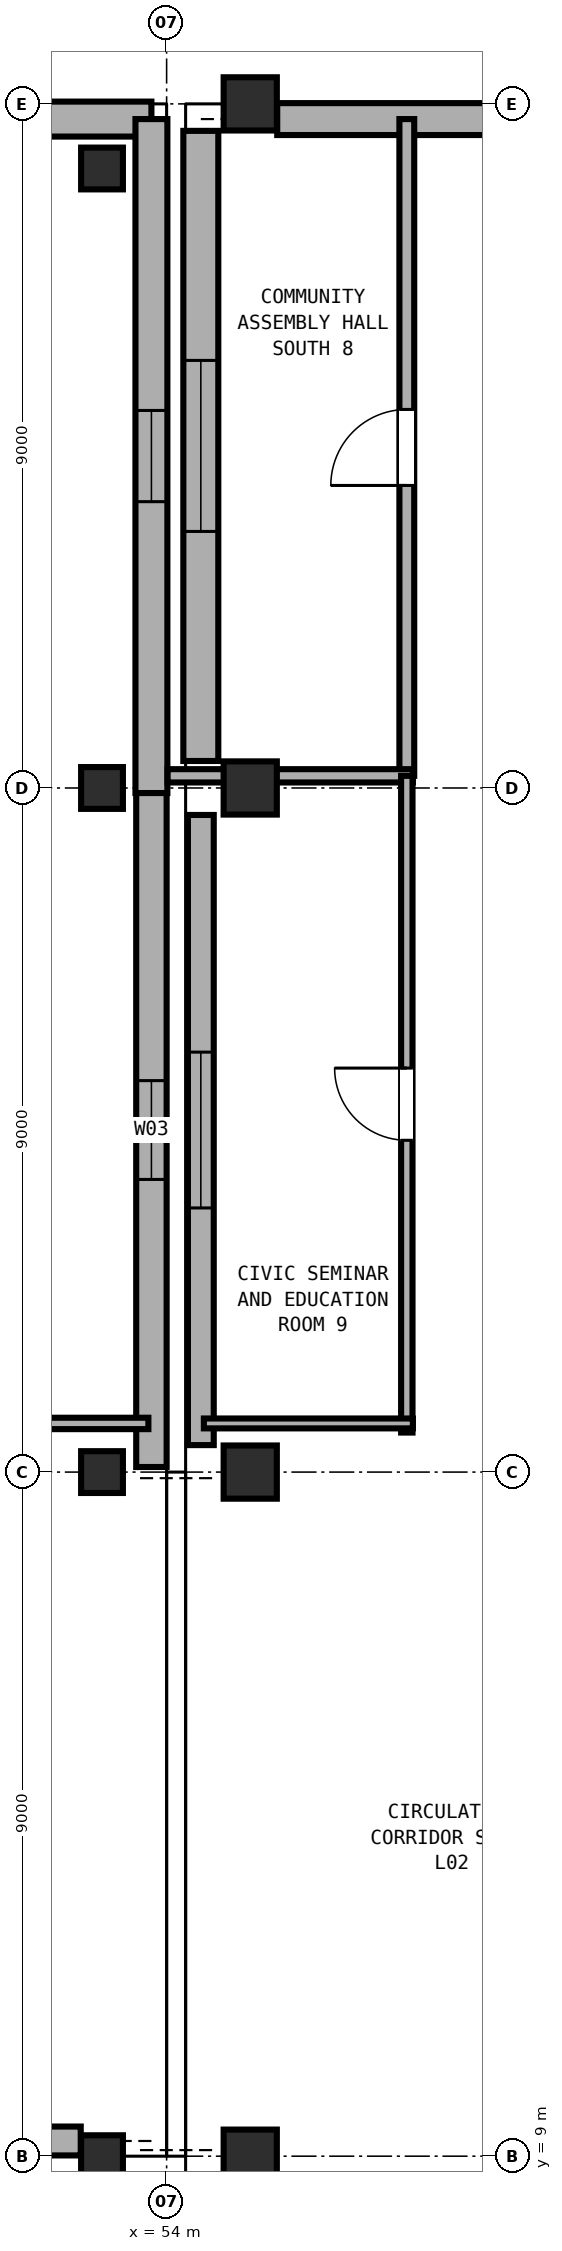
"""IFC4 building model, lengths in metres.
Left out: names, types, materials, properties, quantities, classifications, styles, units other than length and angle.
Written with IfcOpenShell. Run it as: python <this file> out.ifc"""

import sys

from ifc_helpers import new_model, si_unit, direction, frame, frame_2d, origin, origin_2d, place, context, subcontext, project, spatial, rectangle, extrude, element, fill, save


model = new_model("IFC4")
c1 = context("Model", 3, precision=1e-05, world=origin(), true_north=direction((0.0, 1.0)))
c2 = subcontext(c1, "Body", "Model", "MODEL_VIEW")
j1 = project(units=[si_unit("LENGTHUNIT", "METRE"), si_unit("PLANEANGLEUNIT", "RADIAN")], contexts=[c1])
p1 = place(None, origin())
s1 = spatial("IfcSite", under=j1, at=p1, CompositionType="ELEMENT")
p2 = place(p1, origin())
s2 = spatial("IfcBuilding", under=s1, at=p2, CompositionType="ELEMENT")
p3 = place(p2, frame((0.0, 0.0, 9.6)))
s3 = spatial("IfcBuildingStorey", under=s2, at=p3, CompositionType="ELEMENT", Elevation=9.6)
for number, where, z_axis, x_axis in (
    (1, (55.1, 9.0, 0.0), (0.0, 0.0, 1.0), (1.0, 0.0, 0.0)),
    (2, (55.1, 18.0, 0.0), (0.0, 0.0, 1.0), (1.0, 0.0, 0.0)),
    (3, (55.1, 27.0, 0.0), (0.0, 0.0, 1.0), (1.0, 0.0, 0.0)),
    (4, (55.1, 36.0, 0.0), (0.0, 0.0, 1.0), (1.0, 0.0, 0.0)),
):
    element("IfcColumn", number, at=place(p3, frame(where, z_axis=z_axis, x_axis=x_axis)), inside=s3, PredefinedType="COLUMN", context=c2, shape_type="SweptSolid", body=[
        extrude(rectangle(XDim=0.7, YDim=0.7, at=origin_2d()), origin(), (0.0, 0.0, 1.0), 4.8),
    ])
for number, where, z_axis, x_axis in (
    (5, (53.15, 9.0, 0.0), (0.0, 0.0, 1.0), (1.0, 0.0, 0.0)),
    (6, (53.15, 18.0, 0.0), (0.0, 0.0, 1.0), (1.0, 0.0, 0.0)),
    (7, (53.15, 27.0, 0.0), (0.0, 0.0, 1.0), (1.0, 0.0, 0.0)),
    (8, (53.15, 35.15, 0.0), (0.0, 0.0, 1.0), (1.0, 0.0, 0.0)),
):
    element("IfcColumn", number, at=place(p3, frame(where, z_axis=z_axis, x_axis=x_axis)), inside=s3, PredefinedType="COLUMN", context=c2, shape_type="SweptSolid", body=[
        extrude(rectangle(XDim=0.55, YDim=0.55, at=origin_2d()), origin(), (0.0, 0.0, 1.0), 4.8),
    ])
p4 = place(p3, frame((54.45, 18.355, 0.0), z_axis=(0.0, 0.0, 1.0), x_axis=(0.0, 1.0, 0.0)))
e9 = element("IfcWall", 9, at=p4, inside=s3, PredefinedType="SOLIDWALL", context=c2, shape_type="SweptSolid", body=[
    extrude(rectangle(XDim=8.29, YDim=0.34, at=frame_2d((4.145, 0.0))), origin(), (0.0, 0.0, 1.0), 3.58),
])
p5 = place(p4, frame((3.12, 0.0, 0.9)))
e10 = element("IfcOpeningElement", 10, at=p5, cuts=e9, PredefinedType="OPENING", context=c2, shape_type="SweptSolid", body=[
    extrude(rectangle(XDim=2.05, YDim=2.0, at=frame_2d((1.025, 1.0))), frame((0.0, 0.18, 0.0), z_axis=(0.0, -1.0, 0.0), x_axis=(1.0, 0.0, 0.0)), (0.0, 0.0, 1.0), 0.36),
])
p6 = place(p3, frame((54.45, 27.355, 0.0), z_axis=(0.0, 0.0, 1.0), x_axis=(0.0, 1.0, 0.0)))
e11 = element("IfcWall", 11, at=p6, inside=s3, PredefinedType="SOLIDWALL", context=c2, shape_type="SweptSolid", body=[
    extrude(rectangle(XDim=8.29, YDim=0.46, at=frame_2d((4.145, 0.0))), origin(), (0.0, 0.0, 1.0), 3.58),
])
p7 = place(p6, frame((3.02, 0.0, 0.9)))
e12 = element("IfcOpeningElement", 12, at=p7, cuts=e11, PredefinedType="OPENING", context=c2, shape_type="SweptSolid", body=[
    extrude(rectangle(XDim=2.25, YDim=2.05, at=frame_2d((1.125, 1.025))), frame((0.0, 0.24, 0.0), z_axis=(0.0, -1.0, 0.0), x_axis=(1.0, 0.0, 0.0)), (0.0, 0.0, 1.0), 0.48),
])
p8 = place(p3, frame((55.455, 35.8, 0.0), z_axis=(0.0, 0.0, 1.0), x_axis=(1.0, 0.0, 0.0)))
e13 = element("IfcWall", 13, at=p8, inside=s3, PredefinedType="SOLIDWALL", context=c2, shape_type="SweptSolid", body=[
    extrude(rectangle(XDim=7.19, YDim=0.42, at=frame_2d((3.595, 0.0))), origin(), (0.0, 0.0, 1.0), 3.58),
])
p9 = place(p8, frame((3.045, 0.0, 0.9)))
e14 = element("IfcOpeningElement", 14, at=p9, cuts=e13, PredefinedType="OPENING", context=c2, shape_type="SweptSolid", body=[
    extrude(rectangle(XDim=1.1, YDim=1.4, at=frame_2d((0.55, 0.7))), frame((0.0, 0.22, 0.0), z_axis=(0.0, -1.0, 0.0), x_axis=(1.0, 0.0, 0.0)), (0.0, 0.0, 1.0), 0.44),
])
p10 = place(p3, frame((44.88, 35.8, 0.0), z_axis=(0.0, 0.0, 1.0), x_axis=(1.0, 0.0, 0.0)))
e15 = element("IfcWall", 15, at=p10, inside=s3, PredefinedType="SOLIDWALL", context=c2, shape_type="SweptSolid", body=[
    extrude(rectangle(XDim=8.92, YDim=0.46, at=frame_2d((4.46, 0.0))), origin(), (0.0, 0.0, 1.0), 3.58),
])
p11 = place(p10, frame((3.91, 0.0, 0.9)))
e16 = element("IfcOpeningElement", 16, at=p11, cuts=e15, PredefinedType="OPENING", context=c2, shape_type="SweptSolid", body=[
    extrude(rectangle(XDim=1.1, YDim=1.4, at=frame_2d((0.55, 0.7))), frame((0.0, 0.24, 0.0), z_axis=(0.0, -1.0, 0.0), x_axis=(1.0, 0.0, 0.0)), (0.0, 0.0, 1.0), 0.48),
])
p12 = place(p3, frame((53.8, 35.8, 0.0), z_axis=(0.0, 0.0, 1.0), x_axis=(0.0, -1.0, 0.0)))
e17 = element("IfcWall", 17, at=p12, inside=s3, PredefinedType="SOLIDWALL", context=c2, shape_type="SweptSolid", body=[
    extrude(rectangle(XDim=8.867, YDim=0.42, at=frame_2d((4.433, 0.0))), origin(), (0.0, 0.0, 1.0), 3.58),
])
p13 = place(p12, frame((3.833, 0.0, 0.9)))
e18 = element("IfcOpeningElement", 18, at=p13, cuts=e17, PredefinedType="OPENING", context=c2, shape_type="SweptSolid", body=[
    extrude(rectangle(XDim=1.2, YDim=1.45, at=frame_2d((0.6, 0.725))), frame((0.0, 0.22, 0.0), z_axis=(0.0, -1.0, 0.0), x_axis=(1.0, 0.0, 0.0)), (0.0, 0.0, 1.0), 0.44),
])
p14 = place(p3, frame((53.8, 26.933, 0.0), z_axis=(0.0, 0.0, 1.0), x_axis=(0.0, -1.0, 0.0)))
e19 = element("IfcWall", 19, at=p14, inside=s3, PredefinedType="SOLIDWALL", context=c2, shape_type="SweptSolid", body=[
    extrude(rectangle(XDim=8.867, YDim=0.4, at=frame_2d((4.433, 0.0))), origin(), (0.0, 0.0, 1.0), 3.58),
])
p15 = place(p14, frame((3.783, 0.0, 0.9)))
e20 = element("IfcOpeningElement", 20, at=p15, cuts=e19, PredefinedType="OPENING", context=c2, shape_type="SweptSolid", body=[
    extrude(rectangle(XDim=1.3, YDim=1.5, at=frame_2d((0.65, 0.75))), frame((0.0, 0.21, 0.0), z_axis=(0.0, -1.0, 0.0), x_axis=(1.0, 0.0, 0.0)), (0.0, 0.0, 1.0), 0.42),
])
p16 = place(p3, frame((52.87, 9.2, 0.0), z_axis=(0.0, 0.0, 1.0), x_axis=(-1.0, 0.0, 0.0)))
e21 = element("IfcWall", 21, at=p16, inside=s3, PredefinedType="SOLIDWALL", context=c2, shape_type="SweptSolid", body=[
    extrude(rectangle(XDim=7.59, YDim=0.38, at=frame_2d((3.795, 0.0))), origin(), (0.0, 0.0, 1.0), 3.58),
])
p17 = place(p16, frame((3.095, 0.0, 0.9)))
e22 = element("IfcOpeningElement", 22, at=p17, cuts=e21, PredefinedType="OPENING", context=c2, shape_type="SweptSolid", body=[
    extrude(rectangle(XDim=1.4, YDim=1.55, at=frame_2d((0.7, 0.775))), frame((0.0, 0.2, 0.0), z_axis=(0.0, -1.0, 0.0), x_axis=(1.0, 0.0, 0.0)), (0.0, 0.0, 1.0), 0.4),
])
p18 = place(p3, frame((57.16, 27.16, 0.0), z_axis=(0.0, 0.0, 1.0), x_axis=(0.0, 1.0, 0.0)))
e23 = element("IfcWall", 23, at=p18, inside=s3, PredefinedType="PARTITIONING", context=c2, shape_type="SweptSolid", body=[
    extrude(rectangle(XDim=8.64, YDim=0.195, at=frame_2d((4.32, 0.0))), origin(), (0.0, 0.0, 1.0), 3.56),
])
p19 = place(p18, frame((3.82, 0.0, 0.0)))
e24 = element("IfcOpeningElement", 24, at=p19, cuts=e23, PredefinedType="OPENING", context=c2, shape_type="SweptSolid", body=[
    extrude(rectangle(XDim=1.0, YDim=2.1, at=frame_2d((0.5, 1.05))), frame((0.0, 0.107, 0.0), z_axis=(0.0, -1.0, 0.0), x_axis=(1.0, 0.0, 0.0)), (0.0, 0.0, 1.0), 0.215),
])
p20 = place(p3, frame((57.24, 27.16, 0.0), z_axis=(0.0, 0.0, 1.0), x_axis=(-1.0, 0.0, 0.0)))
e25 = element("IfcWall", 25, at=p20, inside=s3, PredefinedType="PARTITIONING", context=c2, shape_type="SweptSolid", body=[
    extrude(rectangle(XDim=3.227, YDim=0.175, at=frame_2d((1.614, 0.0))), origin(), (0.0, 0.0, 1.0), 3.56),
])
p21 = place(p3, frame((57.16, 18.52, 0.0), z_axis=(0.0, 0.0, 1.0), x_axis=(0.0, 1.0, 0.0)))
e26 = element("IfcWall", 26, at=p21, inside=s3, PredefinedType="PARTITIONING", context=c2, shape_type="SweptSolid", body=[
    extrude(rectangle(XDim=8.64, YDim=0.15, at=frame_2d((4.32, 0.0))), origin(), (0.0, 0.0, 1.0), 3.56),
])
p22 = place(p21, frame((3.845, 0.0, 0.0)))
e27 = element("IfcOpeningElement", 27, at=p22, cuts=e26, PredefinedType="OPENING", context=c2, shape_type="SweptSolid", body=[
    extrude(rectangle(XDim=0.95, YDim=2.1, at=frame_2d((0.475, 1.05))), frame((0.0, 0.085, 0.0), z_axis=(0.0, -1.0, 0.0), x_axis=(1.0, 0.0, 0.0)), (0.0, 0.0, 1.0), 0.17),
])
p23 = place(p3, frame((57.24, 18.64, 0.0), z_axis=(0.0, 0.0, 1.0), x_axis=(-1.0, 0.0, 0.0)))
e28 = element("IfcWall", 28, at=p23, inside=s3, PredefinedType="PARTITIONING", context=c2, shape_type="SweptSolid", body=[
    extrude(rectangle(XDim=2.75, YDim=0.13, at=frame_2d((1.375, 0.0))), origin(), (0.0, 0.0, 1.0), 3.56),
])
p24 = place(p3, frame((53.76, 18.64, 0.0), z_axis=(0.0, 0.0, 1.0), x_axis=(-1.0, 0.0, 0.0)))
e29 = element("IfcWall", 29, at=p24, inside=s3, PredefinedType="PARTITIONING", context=c2, shape_type="SweptSolid", body=[
    extrude(rectangle(XDim=3.01, YDim=0.15, at=frame_2d((1.505, 0.0))), origin(), (0.0, 0.0, 1.0), 3.56),
])
p25 = place(p5, origin())
e30 = element("IfcWindow", 30, at=p25, inside=s3, PartitioningType="DOUBLE_PANEL_VERTICAL", PredefinedType="WINDOW", context=c2, shape_type="SweptSolid", body=[
    extrude(rectangle(XDim=2.05, YDim=2.0, at=frame_2d((1.025, 1.0))), frame((0.0, 0.03, 0.0), z_axis=(0.0, -1.0, 0.0), x_axis=(1.0, 0.0, 0.0)), (0.0, 0.0, 1.0), 0.06),
])
fill(e10, e30)
p26 = place(p7, origin())
e31 = element("IfcWindow", 31, at=p26, inside=s3, PartitioningType="DOUBLE_PANEL_VERTICAL", PredefinedType="WINDOW", context=c2, shape_type="SweptSolid", body=[
    extrude(rectangle(XDim=2.25, YDim=2.05, at=frame_2d((1.125, 1.025))), frame((0.0, 0.03, 0.0), z_axis=(0.0, -1.0, 0.0), x_axis=(1.0, 0.0, 0.0)), (0.0, 0.0, 1.0), 0.06),
])
fill(e12, e31)
p27 = place(p13, origin())
e32 = element("IfcWindow", 32, at=p27, inside=s3, PartitioningType="SINGLE_PANEL", PredefinedType="WINDOW", context=c2, shape_type="SweptSolid", body=[
    extrude(rectangle(XDim=1.2, YDim=1.45, at=frame_2d((0.6, 0.725))), frame((0.0, 0.03, 0.0), z_axis=(0.0, -1.0, 0.0), x_axis=(1.0, 0.0, 0.0)), (0.0, 0.0, 1.0), 0.06),
])
fill(e18, e32)
p28 = place(p15, origin())
e33 = element("IfcWindow", 33, at=p28, inside=s3, PartitioningType="SINGLE_PANEL", PredefinedType="WINDOW", context=c2, shape_type="SweptSolid", body=[
    extrude(rectangle(XDim=1.3, YDim=1.5, at=frame_2d((0.65, 0.75))), frame((0.0, 0.03, 0.0), z_axis=(0.0, -1.0, 0.0), x_axis=(1.0, 0.0, 0.0)), (0.0, 0.0, 1.0), 0.06),
])
fill(e20, e33)
p29 = place(p19, origin())
e34 = element("IfcDoor", 34, at=p29, inside=s3, OperationType="SINGLE_SWING_LEFT", PredefinedType="DOOR", context=c2, shape_type="SweptSolid", body=[
    extrude(rectangle(XDim=1.0, YDim=2.1, at=frame_2d((0.5, 1.05))), frame((0.0, 0.025, 0.0), z_axis=(0.0, -1.0, 0.0), x_axis=(1.0, 0.0, 0.0)), (0.0, 0.0, 1.0), 0.05),
])
fill(e24, e34)
p30 = place(p22, origin())
e35 = element("IfcDoor", 35, at=p30, inside=s3, OperationType="SINGLE_SWING_RIGHT", PredefinedType="DOOR", context=c2, shape_type="SweptSolid", body=[
    extrude(rectangle(XDim=0.95, YDim=2.1, at=frame_2d((0.475, 1.05))), frame((0.0, 0.025, 0.0), z_axis=(0.0, -1.0, 0.0), x_axis=(1.0, 0.0, 0.0)), (0.0, 0.0, 1.0), 0.05),
])
fill(e27, e35)
save(model, sys.argv[1])
